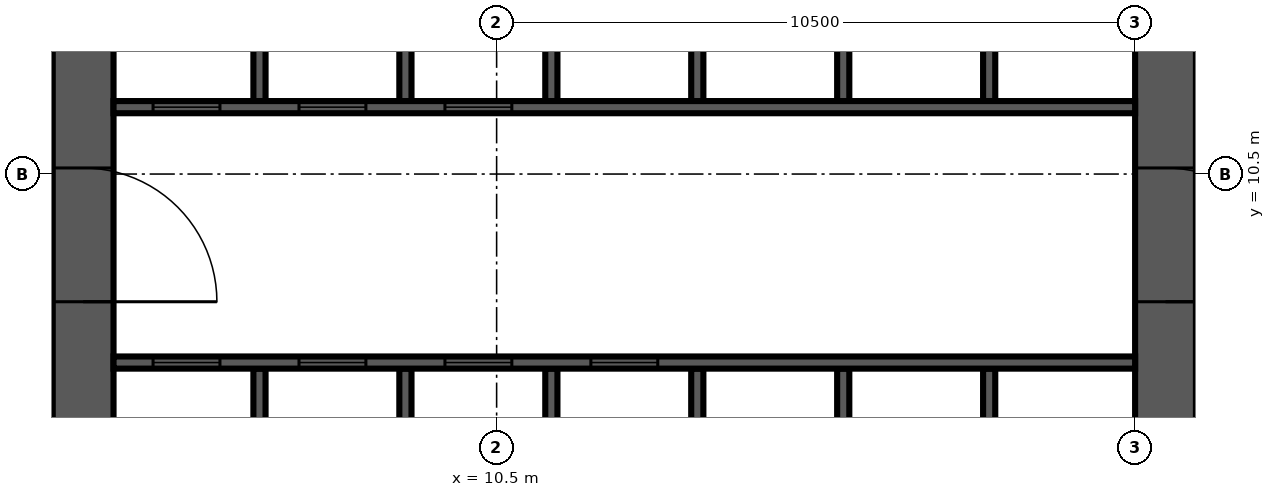
"""IFC4 building model, lengths in metres.
Left out: names, types, materials, properties, quantities, classifications, styles, units other than length and angle.
Written with IfcOpenShell. Run it as: python <this file> out.ifc"""

import sys

from ifc_helpers import new_model, si_unit, direction, frame, frame_2d, origin, place, context, subcontext, project, spatial, rectangle, extrude, source, transform, mapped, element, fill, save


model = new_model("IFC4")
c1 = context("Model", 3, precision=1e-05, world=origin(), true_north=direction((0.0, 1.0)))
c2 = subcontext(c1, "Body", "Model", "MODEL_VIEW")
j1 = project(units=[si_unit("LENGTHUNIT", "METRE"), si_unit("PLANEANGLEUNIT", "RADIAN")], contexts=[c1])
p1 = place(None, origin())
s1 = spatial("IfcSite", under=j1, at=p1, CompositionType="ELEMENT")
p2 = place(p1, origin())
s2 = spatial("IfcBuilding", under=s1, at=p2, CompositionType="ELEMENT")
p3 = place(p2, frame((0.0, 0.0, 128.7)))
s3 = spatial("IfcBuildingStorey", under=s2, at=p3, CompositionType="ELEMENT", Elevation=128.7)
m1 = source(origin(), c2, "Body", "SweptSolid", [
    extrude(rectangle(XDim=17.8, YDim=1.0, at=frame_2d((8.9, 0.0))), origin(), (0.0, 0.0, 1.0), 4.2),
])
p4 = place(p3, frame((3.7, 4.2, 0.0), z_axis=(0.0, 0.0, 1.0), x_axis=(0.0, 1.0, 0.0)))
e1 = element("IfcWall", 1, at=p4, inside=s3, PredefinedType="SHEAR", context=c2, shape_type="MappedRepresentation", body=[
    mapped(m1, transform((0.0, 0.0, 0.0), scale=1.0)),
])
m2 = source(origin(), c2, "Body", "SweptSolid", [
    extrude(rectangle(XDim=2.2, YDim=2.1, at=frame_2d((1.1, 1.05))), frame((0.0, 0.51, 0.0), z_axis=(0.0, -1.0, 0.0), x_axis=(1.0, 0.0, 0.0)), (0.0, 0.0, 1.0), 1.02),
])
p5 = place(p4, frame((4.2, 0.0, 0.0)))
e2 = element("IfcOpeningElement", 2, at=p5, cuts=e1, PredefinedType="OPENING", context=c2, shape_type="MappedRepresentation", body=[
    mapped(m2, transform((0.0, 0.0, 0.0), scale=1.0)),
])
m3 = source(origin(), c2, "Body", "SweptSolid", [
    extrude(rectangle(XDim=0.9, YDim=2.1, at=frame_2d((0.45, 1.05))), frame((0.0, 0.51, 0.0), z_axis=(0.0, -1.0, 0.0), x_axis=(1.0, 0.0, 0.0)), (0.0, 0.0, 1.0), 1.02),
])
p6 = place(p4, frame((10.95, 0.0, 0.0)))
e3 = element("IfcOpeningElement", 3, at=p6, cuts=e1, PredefinedType="OPENING", context=c2, shape_type="MappedRepresentation", body=[
    mapped(m3, transform((0.0, 0.0, 0.0), scale=1.0)),
])
m4 = source(origin(), c2, "Body", "SweptSolid", [
    extrude(rectangle(XDim=16.8, YDim=1.0, at=frame_2d((8.4, 0.0))), origin(), (0.0, 0.0, 1.0), 4.2),
])
p7 = place(p3, frame((21.5, 4.2, 0.0), z_axis=(0.0, 0.0, 1.0), x_axis=(0.0, 1.0, 0.0)))
e4 = element("IfcWall", 4, at=p7, inside=s3, PredefinedType="SHEAR", context=c2, shape_type="MappedRepresentation", body=[
    mapped(m4, transform((0.0, 0.0, 0.0), scale=1.0)),
])
p8 = place(p7, frame((4.2, 0.0, 0.0)))
e5 = element("IfcOpeningElement", 5, at=p8, cuts=e4, PredefinedType="OPENING", context=c2, shape_type="MappedRepresentation", body=[
    mapped(m2, transform((0.0, 0.0, 0.0), scale=1.0)),
])
m5 = source(origin(), c2, "Body", "SweptSolid", [
    extrude(rectangle(XDim=1.2, YDim=2.1, at=frame_2d((0.6, 1.05))), frame((0.0, 0.51, 0.0), z_axis=(0.0, -1.0, 0.0), x_axis=(1.0, 0.0, 0.0)), (0.0, 0.0, 1.0), 1.02),
])
p9 = place(p7, frame((14.7, 0.0, 0.0)))
e6 = element("IfcOpeningElement", 6, at=p9, cuts=e4, PredefinedType="OPENING", context=c2, shape_type="MappedRepresentation", body=[
    mapped(m5, transform((0.0, 0.0, 0.0), scale=1.0)),
])
m6 = source(origin(), c2, "Body", "SweptSolid", [
    extrude(rectangle(XDim=3.1, YDim=0.2, at=frame_2d((1.55, 0.0))), origin(), (0.0, 0.0, 1.0), 4.2),
])
for number, where, z_axis, x_axis in (
    (7, (6.6, 4.2, 0.0), (0.0, 0.0, 1.0), (0.0, 1.0, 0.0)),
    (8, (9.0, 4.2, 0.0), (0.0, 0.0, 1.0), (0.0, 1.0, 0.0)),
    (9, (11.4, 4.2, 0.0), (0.0, 0.0, 1.0), (0.0, 1.0, 0.0)),
    (10, (13.8, 4.2, 0.0), (0.0, 0.0, 1.0), (0.0, 1.0, 0.0)),
    (11, (16.2, 4.2, 0.0), (0.0, 0.0, 1.0), (0.0, 1.0, 0.0)),
    (12, (18.6, 4.2, 0.0), (0.0, 0.0, 1.0), (0.0, 1.0, 0.0)),
):
    element("IfcWall", number, at=place(p3, frame(where, z_axis=z_axis, x_axis=x_axis)), inside=s3, PredefinedType="SOLIDWALL", context=c2, shape_type="MappedRepresentation", body=[
        mapped(m6, transform((0.0, 0.0, 0.0), scale=1.0)),
    ])
m7 = source(origin(), c2, "Body", "SweptSolid", [
    extrude(rectangle(XDim=3.0, YDim=0.2, at=frame_2d((1.5, 0.0))), origin(), (0.0, 0.0, 1.0), 4.2),
])
for number, where, z_axis, x_axis in (
    (13, (6.6, 11.7, 0.0), (0.0, 0.0, 1.0), (0.0, 1.0, 0.0)),
    (14, (9.0, 11.7, 0.0), (0.0, 0.0, 1.0), (0.0, 1.0, 0.0)),
    (15, (11.4, 11.7, 0.0), (0.0, 0.0, 1.0), (0.0, 1.0, 0.0)),
    (16, (13.8, 11.7, 0.0), (0.0, 0.0, 1.0), (0.0, 1.0, 0.0)),
    (17, (16.2, 11.7, 0.0), (0.0, 0.0, 1.0), (0.0, 1.0, 0.0)),
    (18, (18.6, 11.7, 0.0), (0.0, 0.0, 1.0), (0.0, 1.0, 0.0)),
):
    element("IfcWall", number, at=place(p3, frame(where, z_axis=z_axis, x_axis=x_axis)), inside=s3, PredefinedType="SOLIDWALL", context=c2, shape_type="MappedRepresentation", body=[
        mapped(m7, transform((0.0, 0.0, 0.0), scale=1.0)),
    ])
m8 = source(origin(), c2, "Body", "SweptSolid", [
    extrude(rectangle(XDim=16.8, YDim=0.2, at=frame_2d((8.4, 0.0))), origin(), (0.0, 0.0, 1.0), 4.2),
])
p10 = place(p3, frame((4.2, 7.4, 0.0), z_axis=(0.0, 0.0, 1.0), x_axis=(1.0, 0.0, 0.0)))
e19 = element("IfcWall", 19, at=p10, inside=s3, PredefinedType="SOLIDWALL", context=c2, shape_type="MappedRepresentation", body=[
    mapped(m8, transform((0.0, 0.0, 0.0), scale=1.0)),
])
m9 = source(origin(), c2, "Body", "SweptSolid", [
    extrude(rectangle(XDim=1.1, YDim=2.1, at=frame_2d((0.55, 1.05))), frame((0.0, 0.11, 0.0), z_axis=(0.0, -1.0, 0.0), x_axis=(1.0, 0.0, 0.0)), (0.0, 0.0, 1.0), 0.22),
])
p11 = place(p10, frame((0.65, 0.0, 0.0)))
e20 = element("IfcOpeningElement", 20, at=p11, cuts=e19, PredefinedType="OPENING", context=c2, shape_type="MappedRepresentation", body=[
    mapped(m9, transform((0.0, 0.0, 0.0), scale=1.0)),
])
p12 = place(p10, frame((3.05, 0.0, 0.0)))
e21 = element("IfcOpeningElement", 21, at=p12, cuts=e19, PredefinedType="OPENING", context=c2, shape_type="MappedRepresentation", body=[
    mapped(m9, transform((0.0, 0.0, 0.0), scale=1.0)),
])
p13 = place(p10, frame((5.45, 0.0, 0.0)))
e22 = element("IfcOpeningElement", 22, at=p13, cuts=e19, PredefinedType="OPENING", context=c2, shape_type="MappedRepresentation", body=[
    mapped(m9, transform((0.0, 0.0, 0.0), scale=1.0)),
])
p14 = place(p10, frame((7.85, 0.0, 0.0)))
e23 = element("IfcOpeningElement", 23, at=p14, cuts=e19, PredefinedType="OPENING", context=c2, shape_type="MappedRepresentation", body=[
    mapped(m9, transform((0.0, 0.0, 0.0), scale=1.0)),
])
p15 = place(p3, frame((4.2, 11.6, 0.0), z_axis=(0.0, 0.0, 1.0), x_axis=(1.0, 0.0, 0.0)))
e24 = element("IfcWall", 24, at=p15, inside=s3, PredefinedType="SOLIDWALL", context=c2, shape_type="MappedRepresentation", body=[
    mapped(m8, transform((0.0, 0.0, 0.0), scale=1.0)),
])
p16 = place(p15, frame((0.65, 0.0, 0.0)))
e25 = element("IfcOpeningElement", 25, at=p16, cuts=e24, PredefinedType="OPENING", context=c2, shape_type="MappedRepresentation", body=[
    mapped(m9, transform((0.0, 0.0, 0.0), scale=1.0)),
])
p17 = place(p15, frame((3.05, 0.0, 0.0)))
e26 = element("IfcOpeningElement", 26, at=p17, cuts=e24, PredefinedType="OPENING", context=c2, shape_type="MappedRepresentation", body=[
    mapped(m9, transform((0.0, 0.0, 0.0), scale=1.0)),
])
p18 = place(p15, frame((5.45, 0.0, 0.0)))
e27 = element("IfcOpeningElement", 27, at=p18, cuts=e24, PredefinedType="OPENING", context=c2, shape_type="MappedRepresentation", body=[
    mapped(m9, transform((0.0, 0.0, 0.0), scale=1.0)),
])
m10 = source(origin(), c2, "Body", "SweptSolid", [
    extrude(rectangle(XDim=1.1, YDim=2.1, at=frame_2d((0.55, 1.05))), frame((0.0, 0.025, 0.0), z_axis=(0.0, -1.0, 0.0), x_axis=(1.0, 0.0, 0.0)), (0.0, 0.0, 1.0), 0.05),
])
p19 = place(p11, origin())
e28 = element("IfcDoor", 28, at=p19, inside=s3, OperationType="SLIDING_TO_LEFT", PredefinedType="DOOR", context=c2, shape_type="MappedRepresentation", body=[
    mapped(m10, transform((0.0, 0.0, 0.0), scale=1.0)),
])
fill(e20, e28)
p20 = place(p12, origin())
e29 = element("IfcDoor", 29, at=p20, inside=s3, OperationType="SLIDING_TO_LEFT", PredefinedType="DOOR", context=c2, shape_type="MappedRepresentation", body=[
    mapped(m10, transform((0.0, 0.0, 0.0), scale=1.0)),
])
fill(e21, e29)
p21 = place(p13, origin())
e30 = element("IfcDoor", 30, at=p21, inside=s3, OperationType="SLIDING_TO_LEFT", PredefinedType="DOOR", context=c2, shape_type="MappedRepresentation", body=[
    mapped(m10, transform((0.0, 0.0, 0.0), scale=1.0)),
])
fill(e22, e30)
p22 = place(p14, origin())
e31 = element("IfcDoor", 31, at=p22, inside=s3, OperationType="SLIDING_TO_LEFT", PredefinedType="DOOR", context=c2, shape_type="MappedRepresentation", body=[
    mapped(m10, transform((0.0, 0.0, 0.0), scale=1.0)),
])
fill(e23, e31)
p23 = place(p16, origin())
e32 = element("IfcDoor", 32, at=p23, inside=s3, OperationType="SLIDING_TO_LEFT", PredefinedType="DOOR", context=c2, shape_type="MappedRepresentation", body=[
    mapped(m10, transform((0.0, 0.0, 0.0), scale=1.0)),
])
fill(e25, e32)
p24 = place(p17, origin())
e33 = element("IfcDoor", 33, at=p24, inside=s3, OperationType="SLIDING_TO_LEFT", PredefinedType="DOOR", context=c2, shape_type="MappedRepresentation", body=[
    mapped(m10, transform((0.0, 0.0, 0.0), scale=1.0)),
])
fill(e26, e33)
p25 = place(p18, origin())
e34 = element("IfcDoor", 34, at=p25, inside=s3, OperationType="SLIDING_TO_LEFT", PredefinedType="DOOR", context=c2, shape_type="MappedRepresentation", body=[
    mapped(m10, transform((0.0, 0.0, 0.0), scale=1.0)),
])
fill(e27, e34)
m11 = source(origin(), c2, "Body", "SweptSolid", [
    extrude(rectangle(XDim=2.2, YDim=2.1, at=frame_2d((1.1, 1.05))), frame((0.0, 0.025, 0.0), z_axis=(0.0, -1.0, 0.0), x_axis=(1.0, 0.0, 0.0)), (0.0, 0.0, 1.0), 0.05),
])
p26 = place(p8, origin())
e35 = element("IfcDoor", 35, at=p26, inside=s3, OperationType="DOUBLE_DOOR_SINGLE_SWING", PredefinedType="DOOR", context=c2, shape_type="MappedRepresentation", body=[
    mapped(m11, transform((0.0, 0.0, 0.0), scale=1.0)),
])
fill(e5, e35)
p27 = place(p5, origin())
e36 = element("IfcDoor", 36, at=p27, inside=s3, OperationType="DOUBLE_DOOR_SINGLE_SWING", PredefinedType="DOOR", context=c2, shape_type="MappedRepresentation", body=[
    mapped(m11, transform((0.0, 0.0, 0.0), scale=1.0)),
])
fill(e2, e36)
save(model, sys.argv[1])
